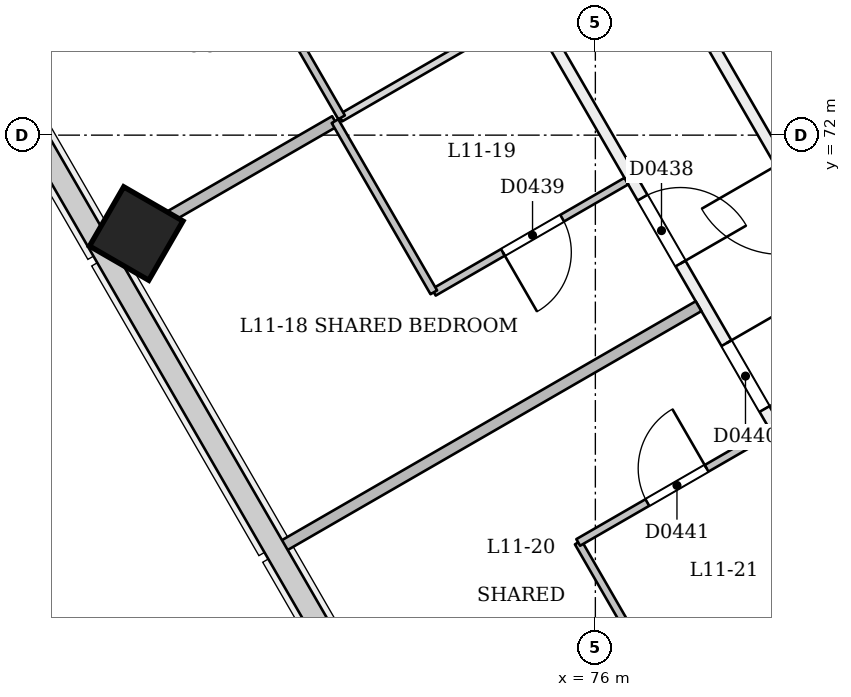
"""IFC4 building model, lengths in metres.
Left out: names, types, materials, properties, quantities, classifications, styles, units other than length and angle.
Written with IfcOpenShell. Run it as: python <this file> out.ifc"""

import sys

from ifc_helpers import new_model, si_unit, direction, frame, frame_2d, origin, origin_2d, place, context, subcontext, project, spatial, rectangle, extrude, element, fill, save


model = new_model("IFC4")
c1 = context("Model", 3, precision=1e-05, world=origin(), true_north=direction((0.0, 1.0)))
c2 = subcontext(c1, "Body", "Model", "MODEL_VIEW")
j1 = project(units=[si_unit("LENGTHUNIT", "METRE"), si_unit("PLANEANGLEUNIT", "RADIAN")], contexts=[c1])
p1 = place(None, origin())
s1 = spatial("IfcSite", under=j1, at=p1, CompositionType="ELEMENT")
p2 = place(p1, origin())
s2 = spatial("IfcBuilding", under=s1, at=p2, CompositionType="ELEMENT")
p3 = place(p2, frame((0.0, 0.0, 48.6)))
s3 = spatial("IfcBuildingStorey", under=s2, at=p3, CompositionType="ELEMENT", Elevation=48.6)
p4 = place(p3, frame((69.933, 70.658, -0.027), z_axis=(0.02215519141, 0.038415882353, 0.999016199807), x_axis=(-0.865363476983, -0.49967097139, 0.038405377942)))
e1 = element("IfcColumn", 1, at=p4, inside=s3, PredefinedType="COLUMN", context=c2, shape_type="SweptSolid", body=[
    extrude(rectangle(XDim=0.9, YDim=0.9, at=origin_2d()), origin(), (0.0, 0.0, 1.0), 3.604),
])
p5 = place(p3, frame((63.923, 93.17, 0.0), z_axis=(0.0, 0.0, 1.0), x_axis=(0.500002225217, -0.866024119051, 0.0)))
e2 = element("IfcWall", 2, at=p5, inside=s3, PredefinedType="PARTITIONING", context=c2, shape_type="SweptSolid", body=[
    extrude(rectangle(XDim=38.6, YDim=0.15, at=frame_2d((19.3, 0.0))), origin(), (0.0, 0.0, 1.0), 2.7),
])
p6 = place(p5, frame((0.605, 0.0, 0.0)))
e3 = element("IfcOpeningElement", 3, at=p6, cuts=e2, PredefinedType="OPENING", context=c2, shape_type="SweptSolid", body=[
    extrude(rectangle(XDim=1.0, YDim=2.1, at=frame_2d((0.5, 1.05))), frame((0.0, 0.085, 0.0), z_axis=(0.0, -1.0, 0.0), x_axis=(1.0, 0.0, 0.0)), (0.0, 0.0, 1.0), 0.171),
])
p7 = place(p5, frame((7.28, 0.0, 0.0)))
e4 = element("IfcOpeningElement", 4, at=p7, cuts=e2, PredefinedType="OPENING", context=c2, shape_type="SweptSolid", body=[
    extrude(rectangle(XDim=1.0, YDim=2.1, at=frame_2d((0.5, 1.05))), frame((0.0, 0.085, 0.0), z_axis=(0.0, -1.0, 0.0), x_axis=(1.0, 0.0, 0.0)), (0.0, 0.0, 1.0), 0.171),
])
p8 = place(p5, frame((9.72, 0.0, 0.0)))
e5 = element("IfcOpeningElement", 5, at=p8, cuts=e2, PredefinedType="OPENING", context=c2, shape_type="SweptSolid", body=[
    extrude(rectangle(XDim=1.0, YDim=2.1, at=frame_2d((0.5, 1.05))), frame((0.0, 0.085, 0.0), z_axis=(0.0, -1.0, 0.0), x_axis=(1.0, 0.0, 0.0)), (0.0, 0.0, 1.0), 0.171),
])
p9 = place(p5, frame((16.395, 0.0, 0.0)))
e6 = element("IfcOpeningElement", 6, at=p9, cuts=e2, PredefinedType="OPENING", context=c2, shape_type="SweptSolid", body=[
    extrude(rectangle(XDim=1.0, YDim=2.1, at=frame_2d((0.5, 1.05))), frame((0.0, 0.085, 0.0), z_axis=(0.0, -1.0, 0.0), x_axis=(1.0, 0.0, 0.0)), (0.0, 0.0, 1.0), 0.171),
])
p10 = place(p5, frame((18.72, 0.0, 0.0)))
e7 = element("IfcOpeningElement", 7, at=p10, cuts=e2, PredefinedType="OPENING", context=c2, shape_type="SweptSolid", body=[
    extrude(rectangle(XDim=1.0, YDim=2.1, at=frame_2d((0.5, 1.05))), frame((0.0, 0.085, 0.0), z_axis=(0.0, -1.0, 0.0), x_axis=(1.0, 0.0, 0.0)), (0.0, 0.0, 1.0), 0.171),
])
p11 = place(p5, frame((25.395, 0.0, 0.0)))
e8 = element("IfcOpeningElement", 8, at=p11, cuts=e2, PredefinedType="OPENING", context=c2, shape_type="SweptSolid", body=[
    extrude(rectangle(XDim=1.0, YDim=2.1, at=frame_2d((0.5, 1.05))), frame((0.0, 0.085, 0.0), z_axis=(0.0, -1.0, 0.0), x_axis=(1.0, 0.0, 0.0)), (0.0, 0.0, 1.0), 0.171),
])
p12 = place(p5, frame((27.605, 0.0, 0.0)))
e9 = element("IfcOpeningElement", 9, at=p12, cuts=e2, PredefinedType="OPENING", context=c2, shape_type="SweptSolid", body=[
    extrude(rectangle(XDim=1.0, YDim=2.1, at=frame_2d((0.5, 1.05))), frame((0.0, 0.085, 0.0), z_axis=(0.0, -1.0, 0.0), x_axis=(1.0, 0.0, 0.0)), (0.0, 0.0, 1.0), 0.171),
])
p13 = place(p5, frame((34.28, 0.0, 0.0)))
e10 = element("IfcOpeningElement", 10, at=p13, cuts=e2, PredefinedType="OPENING", context=c2, shape_type="SweptSolid", body=[
    extrude(rectangle(XDim=1.0, YDim=2.1, at=frame_2d((0.5, 1.05))), frame((0.0, 0.085, 0.0), z_axis=(0.0, -1.0, 0.0), x_axis=(1.0, 0.0, 0.0)), (0.0, 0.0, 1.0), 0.171),
])
p14 = place(p5, frame((37.342, 0.0, 0.0)))
e11 = element("IfcOpeningElement", 11, at=p14, cuts=e2, PredefinedType="OPENING", context=c2, shape_type="SweptSolid", body=[
    extrude(rectangle(XDim=1.0, YDim=2.1, at=frame_2d((0.5, 1.05))), frame((0.0, 0.085, 0.0), z_axis=(0.0, -1.0, 0.0), x_axis=(1.0, 0.0, 0.0)), (0.0, 0.0, 1.0), 0.171),
])
p15 = place(p3, frame((85.0, 60.262, 0.0), z_axis=(0.0, 0.0, 1.0), x_axis=(-0.499998554739, 0.866026238205, 0.0)))
e12 = element("IfcWall", 12, at=p15, inside=s3, PredefinedType="PARTITIONING", context=c2, shape_type="SweptSolid", body=[
    extrude(rectangle(XDim=35.031, YDim=0.15, at=frame_2d((17.515, 0.0))), origin(), (0.0, 0.0, 1.0), 3.1),
])
p16 = place(p15, frame((6.026, 0.0, 0.0)))
e13 = element("IfcOpeningElement", 13, at=p16, cuts=e12, PredefinedType="OPENING", context=c2, shape_type="SweptSolid", body=[
    extrude(rectangle(XDim=1.2, YDim=2.1, at=frame_2d((0.6, 1.05))), frame((0.0, 0.085, 0.0), z_axis=(0.0, -1.0, 0.0), x_axis=(1.0, 0.0, 0.0)), (0.0, 0.0, 1.0), 0.171),
])
p17 = place(p15, frame((19.295, 0.0, 0.0)))
e14 = element("IfcOpeningElement", 14, at=p17, cuts=e12, PredefinedType="OPENING", context=c2, shape_type="SweptSolid", body=[
    extrude(rectangle(XDim=1.2, YDim=2.1, at=frame_2d((0.6, 1.05))), frame((0.0, 0.085, 0.0), z_axis=(0.0, -1.0, 0.0), x_axis=(1.0, 0.0, 0.0)), (0.0, 0.0, 1.0), 0.171),
])
p18 = place(p15, frame((28.126, 0.0, 0.0)))
e15 = element("IfcOpeningElement", 15, at=p18, cuts=e12, PredefinedType="OPENING", context=c2, shape_type="SweptSolid", body=[
    extrude(rectangle(XDim=1.2, YDim=2.1, at=frame_2d((0.6, 1.05))), frame((0.0, 0.085, 0.0), z_axis=(0.0, -1.0, 0.0), x_axis=(1.0, 0.0, 0.0)), (0.0, 0.0, 1.0), 0.171),
])
p19 = place(p15, frame((11.927, 0.0, 0.0)))
e16 = element("IfcOpeningElement", 16, at=p19, cuts=e12, PredefinedType="OPENING", context=c2, shape_type="SweptSolid", body=[
    extrude(rectangle(XDim=1.2, YDim=2.1, at=frame_2d((0.6, 1.05))), frame((0.0, 0.085, 0.0), z_axis=(0.0, -1.0, 0.0), x_axis=(1.0, 0.0, 0.0)), (0.0, 0.0, 1.0), 0.171),
])
p20 = place(p15, frame((16.039, 0.0, 0.0)))
e17 = element("IfcOpeningElement", 17, at=p20, cuts=e12, PredefinedType="OPENING", context=c2, shape_type="SweptSolid", body=[
    extrude(rectangle(XDim=1.2, YDim=2.1, at=frame_2d((0.6, 1.05))), frame((0.0, 0.085, 0.0), z_axis=(0.0, -1.0, 0.0), x_axis=(1.0, 0.0, 0.0)), (0.0, 0.0, 1.0), 0.171),
])
p21 = place(p15, frame((23.133, 0.0, 0.0)))
e18 = element("IfcOpeningElement", 18, at=p21, cuts=e12, PredefinedType="OPENING", context=c2, shape_type="SweptSolid", body=[
    extrude(rectangle(XDim=1.0, YDim=2.1, at=frame_2d((0.5, 1.05))), frame((0.0, 0.085, 0.0), z_axis=(0.0, -1.0, 0.0), x_axis=(1.0, 0.0, 0.0)), (0.0, 0.0, 1.0), 0.171),
])
p22 = place(p3, frame((72.661, 72.234, 0.0), z_axis=(0.0, 0.0, 1.0), x_axis=(-0.500004234368, 0.866022959057, 0.0)))
e19 = element("IfcWall", 19, at=p22, inside=s3, PredefinedType="PARTITIONING", context=c2, shape_type="SweptSolid", body=[
    extrude(rectangle(XDim=2.5, YDim=0.1, at=frame_2d((1.25, 0.0))), origin(), (0.0, 0.0, 1.0), 2.7),
])
p23 = place(p3, frame((69.63, 70.484, 0.0), z_axis=(0.0, 0.0, 1.0), x_axis=(0.866020560687, 0.500008388397, 0.0)))
e20 = element("IfcWall", 20, at=p23, inside=s3, PredefinedType="PARTITIONING", context=c2, shape_type="SweptSolid", body=[
    extrude(rectangle(XDim=3.4, YDim=0.15, at=frame_2d((1.7, 0.0))), origin(), (0.0, 0.0, 1.0), 2.6),
])
p24 = place(p3, frame((72.644, 72.224, 0.0), z_axis=(0.0, 0.0, 1.0), x_axis=(0.866011243319, 0.500024525844, 0.0)))
e21 = element("IfcWall", 21, at=p24, inside=s3, PredefinedType="PARTITIONING", context=c2, shape_type="SweptSolid", body=[
    extrude(rectangle(XDim=2.845, YDim=0.1, at=frame_2d((1.422, 0.0))), origin(), (0.0, 0.0, 1.0), 2.7),
])
p25 = place(p3, frame((76.408, 71.395, 0.0), z_axis=(0.0, 0.0, 1.0), x_axis=(-0.866046596414, -0.499963291492, 0.0)))
e22 = element("IfcWall", 22, at=p25, inside=s3, PredefinedType="PARTITIONING", context=c2, shape_type="SweptSolid", body=[
    extrude(rectangle(XDim=2.925, YDim=0.1, at=frame_2d((1.462, 0.0))), origin(), (0.0, 0.0, 1.0), 3.1),
])
p26 = place(p25, frame((0.975, 0.0, 0.0)))
e23 = element("IfcOpeningElement", 23, at=p26, cuts=e22, PredefinedType="OPENING", context=c2, shape_type="SweptSolid", body=[
    extrude(rectangle(XDim=0.9, YDim=2.1, at=frame_2d((0.45, 1.05))), frame((0.0, 0.061, 0.0), z_axis=(0.0, -1.0, 0.0), x_axis=(1.0, 0.0, 0.0)), (0.0, 0.0, 1.0), 0.121),
])
p27 = place(p3, frame((73.875, 69.933, 0.0), z_axis=(0.0, 0.0, 1.0), x_axis=(-0.500047596559, 0.865997922154, 0.0)))
e24 = element("IfcWall", 24, at=p27, inside=s3, PredefinedType="PARTITIONING", context=c2, shape_type="SweptSolid", body=[
    extrude(rectangle(XDim=2.6, YDim=0.1, at=frame_2d((1.3, 0.0))), origin(), (0.0, 0.0, 1.0), 2.7),
])
p28 = place(p3, frame((71.863, 66.577, 0.0), z_axis=(0.0, 0.0, 1.0), x_axis=(0.866025401434, 0.500000004071, 0.0)))
e25 = element("IfcWall", 25, at=p28, inside=s3, PredefinedType="PARTITIONING", context=c2, shape_type="SweptSolid", body=[
    extrude(rectangle(XDim=6.345, YDim=0.15, at=frame_2d((3.173, 0.0))), origin(), (0.0, 0.0, 1.0), 2.6),
])
p29 = place(p3, frame((77.037, 64.455, 0.0), z_axis=(0.0, 0.0, 1.0), x_axis=(-0.500048846702, 0.865997200291, 0.0)))
e26 = element("IfcWall", 26, at=p29, inside=s3, PredefinedType="PARTITIONING", context=c2, shape_type="SweptSolid", body=[
    extrude(rectangle(XDim=2.525, YDim=0.1, at=frame_2d((1.263, 0.0))), origin(), (0.0, 0.0, 1.0), 2.7),
])
p30 = place(p3, frame((75.774, 66.642, 0.0), z_axis=(0.0, 0.0, 1.0), x_axis=(0.866046596414, 0.499963291492, 0.0)))
e27 = element("IfcWall", 27, at=p30, inside=s3, PredefinedType="PARTITIONING", context=c2, shape_type="SweptSolid", body=[
    extrude(rectangle(XDim=2.925, YDim=0.1, at=frame_2d((1.462, 0.0))), origin(), (0.0, 0.0, 1.0), 3.1),
])
p31 = place(p30, frame((1.05, 0.0, 0.0)))
e28 = element("IfcOpeningElement", 28, at=p31, cuts=e27, PredefinedType="OPENING", context=c2, shape_type="SweptSolid", body=[
    extrude(rectangle(XDim=0.9, YDim=2.1, at=frame_2d((0.45, 1.05))), frame((0.0, 0.061, 0.0), z_axis=(0.0, -1.0, 0.0), x_axis=(1.0, 0.0, 0.0)), (0.0, 0.0, 1.0), 0.121),
])
p32 = place(p3, frame((77.161, 64.44, 0.0), z_axis=(0.0, 0.0, 1.0), x_axis=(0.866011447264, 0.500024172624, 0.0)))
e29 = element("IfcWall", 29, at=p32, inside=s3, PredefinedType="PARTITIONING", context=c2, shape_type="SweptSolid", body=[
    extrude(rectangle(XDim=2.825, YDim=0.1, at=frame_2d((1.413, 0.0))), origin(), (0.0, 0.0, 1.0), 2.7),
])
p33 = place(p11, origin())
e30 = element("IfcDoor", 30, at=p33, inside=s3, OperationType="SINGLE_SWING_RIGHT", PredefinedType="NOTDEFINED", context=c2, shape_type="SweptSolid", body=[
    extrude(rectangle(XDim=1.0, YDim=2.1, at=frame_2d((0.5, 1.05))), frame((0.0, 0.025, 0.0), z_axis=(0.0, -1.0, 0.0), x_axis=(1.0, 0.0, 0.0)), (0.0, 0.0, 1.0), 0.05),
])
fill(e8, e30)
p34 = place(p26, origin())
e31 = element("IfcDoor", 31, at=p34, inside=s3, OperationType="SINGLE_SWING_RIGHT", PredefinedType="NOTDEFINED", context=c2, shape_type="SweptSolid", body=[
    extrude(rectangle(XDim=0.9, YDim=2.1, at=frame_2d((0.45, 1.05))), frame((0.0, 0.025, 0.0), z_axis=(0.0, -1.0, 0.0), x_axis=(1.0, 0.0, 0.0)), (0.0, 0.0, 1.0), 0.05),
])
fill(e23, e31)
p35 = place(p12, origin())
e32 = element("IfcDoor", 32, at=p35, inside=s3, OperationType="SINGLE_SWING_LEFT", PredefinedType="NOTDEFINED", context=c2, shape_type="SweptSolid", body=[
    extrude(rectangle(XDim=1.0, YDim=2.1, at=frame_2d((0.5, 1.05))), frame((0.0, 0.025, 0.0), z_axis=(0.0, -1.0, 0.0), x_axis=(1.0, 0.0, 0.0)), (0.0, 0.0, 1.0), 0.05),
])
fill(e9, e32)
p36 = place(p31, origin())
e33 = element("IfcDoor", 33, at=p36, inside=s3, OperationType="SINGLE_SWING_RIGHT", PredefinedType="NOTDEFINED", context=c2, shape_type="SweptSolid", body=[
    extrude(rectangle(XDim=0.9, YDim=2.1, at=frame_2d((0.45, 1.05))), frame((0.0, 0.025, 0.0), z_axis=(0.0, -1.0, 0.0), x_axis=(1.0, 0.0, 0.0)), (0.0, 0.0, 1.0), 0.05),
])
fill(e28, e33)
save(model, sys.argv[1])
